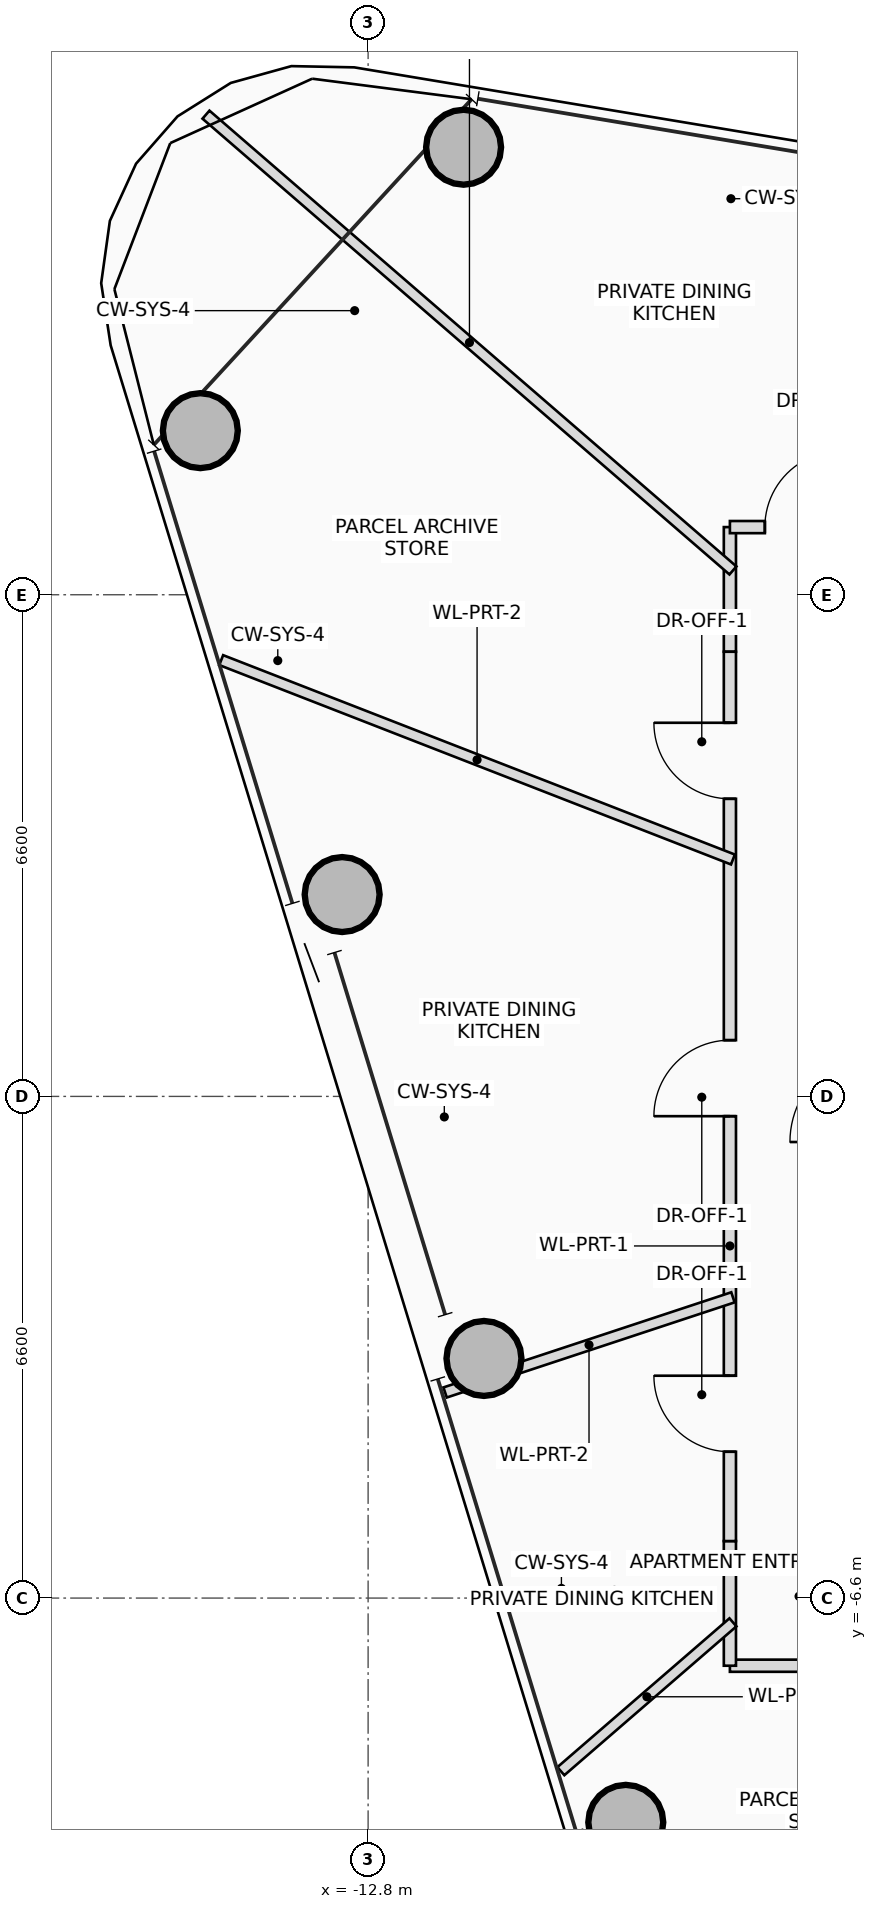
"""IFC4 building model, lengths in metres.
Left out: names, types, materials, properties, quantities, classifications, styles, units other than length and angle.
Written with IfcOpenShell. Run it as: python <this file> out.ifc"""

import sys

from ifc_helpers import new_model, si_unit, direction, frame, frame_2d, origin, origin_2d, place, context, subcontext, project, spatial, rectangle, hollow_circle, extrude, source, transform, mapped, element, fill, save


model = new_model("IFC4")
c1 = context("Model", 3, precision=1e-05, world=origin(), true_north=direction((0.0, 1.0)))
c2 = subcontext(c1, "Body", "Model", "MODEL_VIEW")
j1 = project(units=[si_unit("LENGTHUNIT", "METRE"), si_unit("PLANEANGLEUNIT", "RADIAN")], contexts=[c1])
p1 = place(None, origin())
s1 = spatial("IfcSite", under=j1, at=p1, CompositionType="ELEMENT")
p2 = place(p1, origin())
s2 = spatial("IfcBuilding", under=s1, at=p2, CompositionType="ELEMENT")
p3 = place(p2, frame((0.0, 0.0, 242.25)))
s3 = spatial("IfcBuildingStorey", under=s2, at=p3, CompositionType="ELEMENT", Elevation=242.25)
m1 = source(origin(), c2, "Body", "SweptSolid", [
    extrude(hollow_circle(Radius=0.5, WallThickness=0.04, at=origin_2d()), origin(), (0.0, 0.0, 1.0), 3.4),
])
for number, where, z_axis, x_axis in (
    (1, (-11.544, 12.488, 0.0), (0.0, 0.0, 1.0), (1.0, 0.0, 0.0)),
    (2, (-15.008, 8.759, 0.0), (0.0, 0.0, 1.0), (1.0, 0.0, 0.0)),
    (3, (-13.142, 2.656, 0.0), (0.0, 0.0, 1.0), (1.0, 0.0, 0.0)),
    (4, (-11.276, -3.448, 0.0), (0.0, 0.0, 1.0), (1.0, 0.0, 0.0)),
    (5, (-9.41, -9.55, 0.0), (0.0, 0.0, 1.0), (1.0, 0.0, 0.0)),
):
    element("IfcColumn", number, at=place(p3, frame(where, z_axis=z_axis, x_axis=x_axis)), inside=s3, PredefinedType="COLUMN", context=c2, shape_type="MappedRepresentation", body=[
        mapped(m1, transform((0.0, 0.0, 0.0), scale=1.0)),
    ])
p4 = place(p3, frame((-8.04, 5.85, 0.0), z_axis=(0.0, 0.0, 1.0), x_axis=(0.0, 1.0, 0.0)))
e6 = element("IfcWall", 6, at=p4, inside=s3, PredefinedType="PARTITIONING", context=c2, shape_type="SweptSolid", body=[
    extrude(rectangle(XDim=1.64, YDim=0.16, at=frame_2d((0.82, 0.0))), origin(), (0.0, 0.0, 1.0), 2.605),
])
p5 = place(p3, frame((-8.04, 7.49, 0.0), z_axis=(0.0, 0.0, 1.0), x_axis=(1.0, 0.0, 0.0)))
e7 = element("IfcWall", 7, at=p5, inside=s3, PredefinedType="PARTITIONING", context=c2, shape_type="SweptSolid", body=[
    extrude(rectangle(XDim=1.68, YDim=0.16, at=frame_2d((0.84, 0.0))), origin(), (0.0, 0.0, 1.0), 2.605),
])
p6 = place(p5, frame((0.46, 0.0, 0.0)))
e8 = element("IfcOpeningElement", 8, at=p6, cuts=e7, PredefinedType="OPENING", context=c2, shape_type="SweptSolid", body=[
    extrude(rectangle(XDim=1.0, YDim=2.25, at=frame_2d((0.5, 1.125))), frame((0.0, 0.09, 0.0), z_axis=(0.0, -1.0, 0.0), x_axis=(1.0, 0.0, 0.0)), (0.0, 0.0, 1.0), 0.18),
])
p7 = place(p3, frame((-6.36, -7.49, 0.0), z_axis=(0.0, 0.0, 1.0), x_axis=(-1.0, 0.0, 0.0)))
e9 = element("IfcWall", 9, at=p7, inside=s3, PredefinedType="PARTITIONING", context=c2, shape_type="SweptSolid", body=[
    extrude(rectangle(XDim=1.68, YDim=0.16, at=frame_2d((0.84, 0.0))), origin(), (0.0, 0.0, 1.0), 2.605),
])
p8 = place(p3, frame((-8.04, -7.49, 0.0), z_axis=(0.0, 0.0, 1.0), x_axis=(0.0, 1.0, 0.0)))
e10 = element("IfcWall", 10, at=p8, inside=s3, PredefinedType="PARTITIONING", context=c2, shape_type="SweptSolid", body=[
    extrude(rectangle(XDim=1.64, YDim=0.16, at=frame_2d((0.82, 0.0))), origin(), (0.0, 0.0, 1.0), 2.805),
])
p9 = place(p3, frame((-8.04, -5.85, 0.0), z_axis=(0.0, 0.0, 1.0), x_axis=(0.0, 1.0, 0.0)))
e11 = element("IfcWall", 11, at=p9, inside=s3, PredefinedType="PARTITIONING", context=c2, shape_type="SweptSolid", body=[
    extrude(rectangle(XDim=11.7, YDim=0.16, at=frame_2d((5.85, 0.0))), origin(), (0.0, 0.0, 1.0), 2.605),
])
p10 = place(p9, frame((1.175, 0.0, 0.0)))
e12 = element("IfcOpeningElement", 12, at=p10, cuts=e11, PredefinedType="OPENING", context=c2, shape_type="SweptSolid", body=[
    extrude(rectangle(XDim=1.0, YDim=2.25, at=frame_2d((0.5, 1.125))), frame((0.0, 0.09, 0.0), z_axis=(0.0, -1.0, 0.0), x_axis=(1.0, 0.0, 0.0)), (0.0, 0.0, 1.0), 0.18),
])
p11 = place(p9, frame((5.59, 0.0, 0.0)))
e13 = element("IfcOpeningElement", 13, at=p11, cuts=e11, PredefinedType="OPENING", context=c2, shape_type="SweptSolid", body=[
    extrude(rectangle(XDim=1.0, YDim=2.25, at=frame_2d((0.5, 1.125))), frame((0.0, 0.09, 0.0), z_axis=(0.0, -1.0, 0.0), x_axis=(1.0, 0.0, 0.0)), (0.0, 0.0, 1.0), 0.18),
])
p12 = place(p9, frame((9.766, 0.0, 0.0)))
e14 = element("IfcOpeningElement", 14, at=p12, cuts=e11, PredefinedType="OPENING", context=c2, shape_type="SweptSolid", body=[
    extrude(rectangle(XDim=1.0, YDim=2.25, at=frame_2d((0.5, 1.125))), frame((0.0, 0.09, 0.0), z_axis=(0.0, -1.0, 0.0), x_axis=(1.0, 0.0, 0.0)), (0.0, 0.0, 1.0), 0.18),
])
p13 = place(p3, frame((-8.0, 6.919, 0.0), z_axis=(0.0, 0.0, 1.0), x_axis=(-0.756353912554, 0.654162639535, 0.0)))
e15 = element("IfcWall", 15, at=p13, inside=s3, PredefinedType="PARTITIONING", context=c2, shape_type="SweptSolid", body=[
    extrude(rectangle(XDim=9.167, YDim=0.14, at=frame_2d((4.583, 0.0))), origin(), (0.0, 0.0, 1.0), 2.765),
])
p14 = place(p3, frame((-8.0, 3.117, 0.0), z_axis=(0.0, 0.0, 1.0), x_axis=(-0.931773681271, 0.363039676744, 0.0)))
e16 = element("IfcWall", 16, at=p14, inside=s3, PredefinedType="PARTITIONING", context=c2, shape_type="SweptSolid", body=[
    extrude(rectangle(XDim=7.226, YDim=0.14, at=frame_2d((3.613, 0.0))), origin(), (0.0, 0.0, 1.0), 2.605),
])
p15 = place(p3, frame((-8.0, -2.644, 0.0), z_axis=(0.0, 0.0, 1.0), x_axis=(-0.949500330173, -0.313766032263, 0.0)))
e17 = element("IfcWall", 17, at=p15, inside=s3, PredefinedType="PARTITIONING", context=c2, shape_type="SweptSolid", body=[
    extrude(rectangle(XDim=3.989, YDim=0.14, at=frame_2d((1.994, 0.0))), origin(), (0.0, 0.0, 1.0), 2.605),
])
p16 = place(p3, frame((-8.0, -6.919, 0.0), z_axis=(0.0, 0.0, 1.0), x_axis=(-0.756358809539, -0.654156977516, 0.0)))
e18 = element("IfcWall", 18, at=p16, inside=s3, PredefinedType="PARTITIONING", context=c2, shape_type="SweptSolid", body=[
    extrude(rectangle(XDim=2.993, YDim=0.14, at=frame_2d((1.497, 0.0))), origin(), (0.0, 0.0, 1.0), 2.765),
])
p17 = place(p6, origin())
e19 = element("IfcDoor", 19, at=p17, inside=s3, OperationType="SINGLE_SWING_RIGHT", PredefinedType="DOOR", context=c2, shape_type="SweptSolid", body=[
    extrude(rectangle(XDim=1.0, YDim=2.25, at=frame_2d((0.5, 1.125))), frame((0.0, 0.025, 0.0), z_axis=(0.0, -1.0, 0.0), x_axis=(1.0, 0.0, 0.0)), (0.0, 0.0, 1.0), 0.05),
])
fill(e8, e19)
p18 = place(p10, origin())
e20 = element("IfcDoor", 20, at=p18, inside=s3, OperationType="SINGLE_SWING_RIGHT", PredefinedType="DOOR", context=c2, shape_type="SweptSolid", body=[
    extrude(rectangle(XDim=1.0, YDim=2.25, at=frame_2d((0.5, 1.125))), frame((0.0, 0.025, 0.0), z_axis=(0.0, -1.0, 0.0), x_axis=(1.0, 0.0, 0.0)), (0.0, 0.0, 1.0), 0.05),
])
fill(e12, e20)
p19 = place(p11, origin())
e21 = element("IfcDoor", 21, at=p19, inside=s3, OperationType="SINGLE_SWING_LEFT", PredefinedType="DOOR", context=c2, shape_type="SweptSolid", body=[
    extrude(rectangle(XDim=1.0, YDim=2.25, at=frame_2d((0.5, 1.125))), frame((0.0, 0.025, 0.0), z_axis=(0.0, -1.0, 0.0), x_axis=(1.0, 0.0, 0.0)), (0.0, 0.0, 1.0), 0.05),
])
fill(e13, e21)
p20 = place(p12, origin())
e22 = element("IfcDoor", 22, at=p20, inside=s3, OperationType="SINGLE_SWING_RIGHT", PredefinedType="DOOR", context=c2, shape_type="SweptSolid", body=[
    extrude(rectangle(XDim=1.0, YDim=2.25, at=frame_2d((0.5, 1.125))), frame((0.0, 0.025, 0.0), z_axis=(0.0, -1.0, 0.0), x_axis=(1.0, 0.0, 0.0)), (0.0, 0.0, 1.0), 0.05),
])
fill(e14, e22)
save(model, sys.argv[1])
